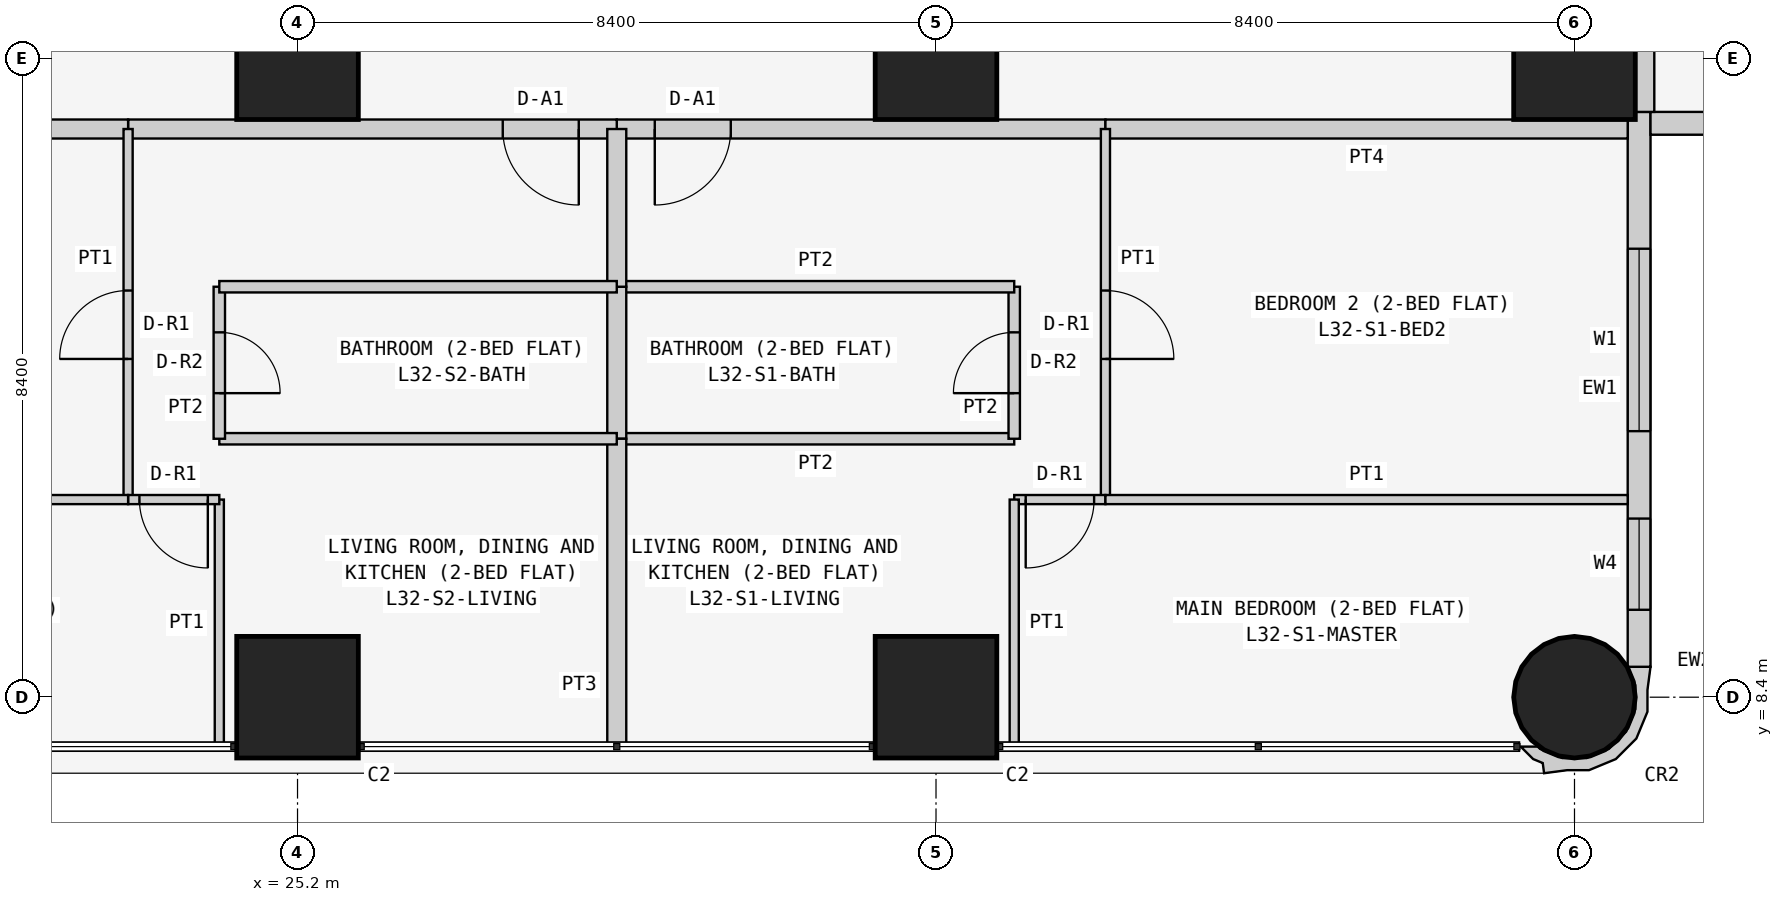
"""IFC4 building model, lengths in metres.
Left out: names, types, materials, properties, quantities, classifications, styles, units other than length and angle.
Written with IfcOpenShell. Run it as: python <this file> out.ifc"""

import sys

from ifc_helpers import new_model, si_unit, direction, frame, frame_2d, origin, origin_2d, place, context, subcontext, project, spatial, polyline, rectangle, circle, outline, extrude, element, fill, save


model = new_model("IFC4")
c1 = context("Model", 3, precision=1e-05, world=origin(), true_north=direction((0.0, 1.0)))
c2 = subcontext(c1, "Body", "Model", "MODEL_VIEW")
j1 = project(units=[si_unit("LENGTHUNIT", "METRE"), si_unit("PLANEANGLEUNIT", "RADIAN")], contexts=[c1])
p1 = place(None, origin())
s1 = spatial("IfcSite", under=j1, at=p1, CompositionType="ELEMENT")
p2 = place(p1, origin())
s2 = spatial("IfcBuilding", under=s1, at=p2, CompositionType="ELEMENT")
p3 = place(p2, frame((0.0, 0.0, 126.9)))
s3 = spatial("IfcBuildingStorey", under=s2, at=p3, CompositionType="ELEMENT", Elevation=126.9)
for number, where, z_axis, x_axis in (
    (1, (25.2, 8.4, 0.0), (0.0, 0.0, 1.0), (1.0, 0.0, 0.0)),
    (2, (25.2, 16.8, 0.0), (0.0, 0.0, 1.0), (1.0, 0.0, 0.0)),
    (3, (33.6, 8.4, 0.0), (0.0, 0.0, 1.0), (1.0, 0.0, 0.0)),
    (4, (33.6, 16.8, 0.0), (0.0, 0.0, 1.0), (1.0, 0.0, 0.0)),
):
    element("IfcColumn", number, at=place(p3, frame(where, z_axis=z_axis, x_axis=x_axis)), inside=s3, PredefinedType="COLUMN", context=c2, shape_type="SweptSolid", body=[
        extrude(rectangle(XDim=1.6, YDim=1.6, at=origin_2d()), origin(), (0.0, 0.0, 1.0), 3.6),
    ])
p4 = place(p3, frame((42.0, 8.4, 0.0), z_axis=(0.0, 0.0, 1.0), x_axis=(1.0, 0.0, 0.0)))
e5 = element("IfcColumn", 5, at=p4, inside=s3, PredefinedType="COLUMN", context=c2, shape_type="SweptSolid", body=[
    extrude(circle(Radius=0.8, at=origin_2d()), origin(), (0.0, 0.0, 1.0), 3.6),
])
p5 = place(p3, frame((42.0, 16.8, 0.0), z_axis=(0.0, 0.0, 1.0), x_axis=(1.0, 0.0, 0.0)))
e6 = element("IfcColumn", 6, at=p5, inside=s3, PredefinedType="COLUMN", context=c2, shape_type="SweptSolid", body=[
    extrude(rectangle(XDim=1.6, YDim=1.6, at=origin_2d()), origin(), (0.0, 0.0, 1.0), 3.6),
])
p6 = place(p3, frame((42.85, 8.8, 0.0), z_axis=(0.0, 0.0, 1.0), x_axis=(0.0, 1.0, 0.0)))
e7 = element("IfcWall", 7, at=p6, inside=s3, PredefinedType="SOLIDWALL", context=c2, shape_type="SweptSolid", body=[
    extrude(rectangle(XDim=7.3, YDim=0.3, at=frame_2d((3.65, 0.0))), origin(), (0.0, 0.0, 1.0), 3.45),
])
p7 = place(p6, frame((3.1, 0.0, 0.9)))
e8 = element("IfcOpeningElement", 8, at=p7, cuts=e7, PredefinedType="OPENING", context=c2, shape_type="SweptSolid", body=[
    extrude(rectangle(XDim=2.4, YDim=1.5, at=frame_2d((1.2, 0.75))), frame((0.0, 0.16, 0.0), z_axis=(0.0, -1.0, 0.0), x_axis=(1.0, 0.0, 0.0)), (0.0, 0.0, 1.0), 0.32),
])
p8 = place(p6, frame((0.75, 0.0, 0.9)))
e9 = element("IfcOpeningElement", 9, at=p8, cuts=e7, PredefinedType="OPENING", context=c2, shape_type="SweptSolid", body=[
    extrude(rectangle(XDim=1.2, YDim=1.5, at=frame_2d((0.6, 0.75))), frame((0.0, 0.16, 0.0), z_axis=(0.0, -1.0, 0.0), x_axis=(1.0, 0.0, 0.0)), (0.0, 0.0, 1.0), 0.32),
])
p9 = place(p3, frame((43.0, 15.95, 0.0), z_axis=(0.0, 0.0, 1.0), x_axis=(1.0, 0.0, 0.0)))
e10 = element("IfcWall", 10, at=p9, inside=s3, PredefinedType="SOLIDWALL", context=c2, shape_type="SweptSolid", body=[
    extrude(rectangle(XDim=15.4, YDim=0.3, at=frame_2d((7.7, 0.0))), origin(), (0.0, 0.0, 1.0), 3.45),
])
p10 = place(p9, frame((1.2, 0.0, 0.9)))
e11 = element("IfcOpeningElement", 11, at=p10, cuts=e10, PredefinedType="OPENING", context=c2, shape_type="SweptSolid", body=[
    extrude(rectangle(XDim=1.8, YDim=1.5, at=frame_2d((0.9, 0.75))), frame((0.0, 0.16, 0.0), z_axis=(0.0, -1.0, 0.0), x_axis=(1.0, 0.0, 0.0)), (0.0, 0.0, 1.0), 0.32),
])
p11 = place(p9, frame((4.95, 0.0, 1.5)))
e12 = element("IfcOpeningElement", 12, at=p11, cuts=e10, PredefinedType="OPENING", context=c2, shape_type="SweptSolid", body=[
    extrude(rectangle(XDim=0.9, YDim=0.7, at=frame_2d((0.45, 0.35))), frame((0.0, 0.16, 0.0), z_axis=(0.0, -1.0, 0.0), x_axis=(1.0, 0.0, 0.0)), (0.0, 0.0, 1.0), 0.32),
])
p12 = place(p9, frame((8.5, 0.0, 0.9)))
e13 = element("IfcOpeningElement", 13, at=p12, cuts=e10, PredefinedType="OPENING", context=c2, shape_type="SweptSolid", body=[
    extrude(rectangle(XDim=1.8, YDim=1.5, at=frame_2d((0.9, 0.75))), frame((0.0, 0.16, 0.0), z_axis=(0.0, -1.0, 0.0), x_axis=(1.0, 0.0, 0.0)), (0.0, 0.0, 1.0), 0.32),
])
p13 = place(p9, frame((12.5, 0.0, 0.0)))
e14 = element("IfcOpeningElement", 14, at=p13, cuts=e10, PredefinedType="OPENING", context=c2, shape_type="SweptSolid", body=[
    extrude(rectangle(XDim=0.9, YDim=2.4, at=frame_2d((0.45, 1.2))), frame((0.0, 0.16, 0.0), z_axis=(0.0, -1.0, 0.0), x_axis=(1.0, 0.0, 0.0)), (0.0, 0.0, 1.0), 0.32),
])
p14 = place(p9, frame((13.5, 0.0, 0.9)))
e15 = element("IfcOpeningElement", 15, at=p14, cuts=e10, PredefinedType="OPENING", context=c2, shape_type="SweptSolid", body=[
    extrude(rectangle(XDim=1.2, YDim=1.5, at=frame_2d((0.6, 0.75))), frame((0.0, 0.16, 0.0), z_axis=(0.0, -1.0, 0.0), x_axis=(1.0, 0.0, 0.0)), (0.0, 0.0, 1.0), 0.32),
])
p15 = place(p3, frame((41.352, 7.805, 0.0), z_axis=(0.0, 0.0, 1.0), x_axis=(0.343276641956, -0.93923434088, 0.0)))
e16 = element("IfcWall", 16, at=p15, inside=s3, PredefinedType="SOLIDWALL", context=c2, shape_type="SweptSolid", body=[
    extrude(outline(polyline([(-0.369, 1.89), (-0.509, 1.621), (-0.49, 1.615), (-0.479, 1.609), (-0.211, 1.62), (0.088, 1.511), (0.323, 1.295), (0.457, 1.006), (0.47, 0.688), (0.361, 0.389), (0.145, 0.154), (0.108, 0.136), (0.031, -0.075), (0.241, 0.023), (0.333, 0.124), (0.465, 0.094), (0.532, 0.393), (0.631, 0.663), (0.614, 1.044), (0.453, 1.391), (0.172, 1.649), (-0.097, 1.748), (-0.369, 1.89)])), origin(), (0.0, 0.0, 1.0), 3.45),
])
p16 = place(p3, frame((42.925, 22.971, 0.0), z_axis=(0.0, 0.0, 1.0), x_axis=(0.0, -1.0, 0.0)))
e17 = element("IfcWall", 17, at=p16, inside=s3, PredefinedType="PARTITIONING", context=c2, shape_type="SweptSolid", body=[
    extrude(rectangle(XDim=6.871, YDim=0.25, at=frame_2d((3.436, 0.0))), origin(), (0.0, 0.0, 1.0), 3.45),
])
p17 = place(p3, frame((35.829, 15.875, 0.0), z_axis=(0.0, 0.0, 1.0), x_axis=(-1.0, 0.0, 0.0)))
e18 = element("IfcWall", 18, at=p17, inside=s3, PredefinedType="PARTITIONING", context=c2, shape_type="SweptSolid", body=[
    extrude(rectangle(XDim=6.429, YDim=0.25, at=frame_2d((3.215, 0.0))), origin(), (0.0, 0.0, 1.0), 3.45),
])
p18 = place(p17, frame((4.929, 0.0, 0.0)))
e19 = element("IfcOpeningElement", 19, at=p18, cuts=e18, PredefinedType="OPENING", context=c2, shape_type="SweptSolid", body=[
    extrude(rectangle(XDim=1.0, YDim=2.1, at=frame_2d((0.5, 1.05))), frame((0.0, 0.135, 0.0), z_axis=(0.0, -1.0, 0.0), x_axis=(1.0, 0.0, 0.0)), (0.0, 0.0, 1.0), 0.27),
])
p19 = place(p3, frame((42.7, 15.875, 0.0), z_axis=(0.0, 0.0, 1.0), x_axis=(-1.0, 0.0, 0.0)))
e20 = element("IfcWall", 20, at=p19, inside=s3, PredefinedType="PARTITIONING", context=c2, shape_type="SweptSolid", body=[
    extrude(rectangle(XDim=6.871, YDim=0.25, at=frame_2d((3.436, 0.0))), origin(), (0.0, 0.0, 1.0), 3.45),
])
p20 = place(p3, frame((29.4, 15.875, 0.0), z_axis=(0.0, 0.0, 1.0), x_axis=(-1.0, 0.0, 0.0)))
e21 = element("IfcWall", 21, at=p20, inside=s3, PredefinedType="PARTITIONING", context=c2, shape_type="SweptSolid", body=[
    extrude(rectangle(XDim=6.429, YDim=0.25, at=frame_2d((3.214, 0.0))), origin(), (0.0, 0.0, 1.0), 3.45),
])
p21 = place(p20, frame((0.5, 0.0, 0.0)))
e22 = element("IfcOpeningElement", 22, at=p21, cuts=e21, PredefinedType="OPENING", context=c2, shape_type="SweptSolid", body=[
    extrude(rectangle(XDim=1.0, YDim=2.1, at=frame_2d((0.5, 1.05))), frame((0.0, 0.135, 0.0), z_axis=(0.0, -1.0, 0.0), x_axis=(1.0, 0.0, 0.0)), (0.0, 0.0, 1.0), 0.27),
])
p22 = place(p3, frame((22.971, 15.875, 0.0), z_axis=(0.0, 0.0, 1.0), x_axis=(-1.0, 0.0, 0.0)))
e23 = element("IfcWall", 23, at=p22, inside=s3, PredefinedType="PARTITIONING", context=c2, shape_type="SweptSolid", body=[
    extrude(rectangle(XDim=6.871, YDim=0.25, at=frame_2d((3.436, 0.0))), origin(), (0.0, 0.0, 1.0), 3.45),
])
p23 = place(p3, frame((29.4, 11.8, 0.0), z_axis=(0.0, 0.0, 1.0), x_axis=(1.0, 0.0, 0.0)))
e24 = element("IfcWall", 24, at=p23, inside=s3, PredefinedType="PARTITIONING", context=c2, shape_type="SweptSolid", body=[
    extrude(rectangle(XDim=5.229, YDim=0.15, at=frame_2d((2.615, 0.0))), origin(), (0.0, 0.0, 1.0), 3.45),
])
p24 = place(p3, frame((34.629, 11.8, 0.0), z_axis=(0.0, 0.0, 1.0), x_axis=(0.0, 1.0, 0.0)))
e25 = element("IfcWall", 25, at=p24, inside=s3, PredefinedType="PARTITIONING", context=c2, shape_type="SweptSolid", body=[
    extrude(rectangle(XDim=2.0, YDim=0.15, at=frame_2d((1.0, 0.0))), origin(), (0.0, 0.0, 1.0), 3.45),
])
p25 = place(p24, frame((0.6, 0.0, 0.0)))
e26 = element("IfcOpeningElement", 26, at=p25, cuts=e25, PredefinedType="OPENING", context=c2, shape_type="SweptSolid", body=[
    extrude(rectangle(XDim=0.8, YDim=2.1, at=frame_2d((0.4, 1.05))), frame((0.0, 0.085, 0.0), z_axis=(0.0, -1.0, 0.0), x_axis=(1.0, 0.0, 0.0)), (0.0, 0.0, 1.0), 0.17),
])
p26 = place(p3, frame((34.629, 13.8, 0.0), z_axis=(0.0, 0.0, 1.0), x_axis=(-1.0, 0.0, 0.0)))
e27 = element("IfcWall", 27, at=p26, inside=s3, PredefinedType="PARTITIONING", context=c2, shape_type="SweptSolid", body=[
    extrude(rectangle(XDim=5.229, YDim=0.15, at=frame_2d((2.615, 0.0))), origin(), (0.0, 0.0, 1.0), 3.45),
])
p27 = place(p3, frame((29.4, 13.8, 0.0), z_axis=(0.0, 0.0, 1.0), x_axis=(0.0, -1.0, 0.0)))
e28 = element("IfcWall", 28, at=p27, inside=s3, PredefinedType="PARTITIONING", context=c2, shape_type="SweptSolid", body=[
    extrude(rectangle(XDim=2.0, YDim=0.25, at=frame_2d((1.0, 0.0))), origin(), (0.0, 0.0, 1.0), 2.848),
])
p28 = place(p3, frame((35.829, 15.875, 0.0), z_axis=(0.0, 0.0, 1.0), x_axis=(0.0, -1.0, 0.0)))
e29 = element("IfcWall", 29, at=p28, inside=s3, PredefinedType="PARTITIONING", context=c2, shape_type="SweptSolid", body=[
    extrude(rectangle(XDim=4.875, YDim=0.12, at=frame_2d((2.438, 0.0))), origin(), (0.0, 0.0, 1.0), 3.45),
])
p29 = place(p28, frame((2.125, 0.0, 0.0)))
e30 = element("IfcOpeningElement", 30, at=p29, cuts=e29, PredefinedType="OPENING", context=c2, shape_type="SweptSolid", body=[
    extrude(rectangle(XDim=0.9, YDim=2.1, at=frame_2d((0.45, 1.05))), frame((0.0, 0.07, 0.0), z_axis=(0.0, -1.0, 0.0), x_axis=(1.0, 0.0, 0.0)), (0.0, 0.0, 1.0), 0.14),
])
p30 = place(p3, frame((35.829, 11.0, 0.0), z_axis=(0.0, 0.0, 1.0), x_axis=(-1.0, 0.0, 0.0)))
e31 = element("IfcWall", 31, at=p30, inside=s3, PredefinedType="PARTITIONING", context=c2, shape_type="SweptSolid", body=[
    extrude(rectangle(XDim=1.2, YDim=0.12, at=frame_2d((0.6, 0.0))), origin(), (0.0, 0.0, 1.0), 3.45),
])
p31 = place(p30, frame((0.149, 0.0, 0.0)))
e32 = element("IfcOpeningElement", 32, at=p31, cuts=e31, PredefinedType="OPENING", context=c2, shape_type="SweptSolid", body=[
    extrude(rectangle(XDim=0.9, YDim=2.1, at=frame_2d((0.45, 1.05))), frame((0.0, 0.07, 0.0), z_axis=(0.0, -1.0, 0.0), x_axis=(1.0, 0.0, 0.0)), (0.0, 0.0, 1.0), 0.14),
])
p32 = place(p3, frame((34.629, 11.0, 0.0), z_axis=(0.0, 0.0, 1.0), x_axis=(0.0, -1.0, 0.0)))
e33 = element("IfcWall", 33, at=p32, inside=s3, PredefinedType="PARTITIONING", context=c2, shape_type="SweptSolid", body=[
    extrude(rectangle(XDim=3.25, YDim=0.12, at=frame_2d((1.625, 0.0))), origin(), (0.0, 0.0, 1.0), 3.45),
])
p33 = place(p3, frame((29.4, 7.75, 0.0), z_axis=(0.0, 0.0, 1.0), x_axis=(0.0, 1.0, 0.0)))
e34 = element("IfcWall", 34, at=p33, inside=s3, PredefinedType="PARTITIONING", context=c2, shape_type="SweptSolid", body=[
    extrude(rectangle(XDim=4.05, YDim=0.25, at=frame_2d((2.025, 0.0))), origin(), (0.0, 0.0, 1.0), 2.848),
])
p34 = place(p3, frame((29.4, 13.8, 0.0), z_axis=(0.0, 0.0, 1.0), x_axis=(0.0, 1.0, 0.0)))
e35 = element("IfcWall", 35, at=p34, inside=s3, PredefinedType="PARTITIONING", context=c2, shape_type="SweptSolid", body=[
    extrude(rectangle(XDim=2.075, YDim=0.25, at=frame_2d((1.038, 0.0))), origin(), (0.0, 0.0, 1.0), 2.848),
])
p35 = place(p3, frame((35.829, 11.0, 0.0), z_axis=(0.0, 0.0, 1.0), x_axis=(1.0, 0.0, 0.0)))
e36 = element("IfcWall", 36, at=p35, inside=s3, PredefinedType="PARTITIONING", context=c2, shape_type="SweptSolid", body=[
    extrude(rectangle(XDim=6.871, YDim=0.12, at=frame_2d((3.436, 0.0))), origin(), (0.0, 0.0, 1.0), 3.45),
])
p36 = place(p3, frame((29.4, 11.8, 0.0), z_axis=(0.0, 0.0, 1.0), x_axis=(-1.0, 0.0, 0.0)))
e37 = element("IfcWall", 37, at=p36, inside=s3, PredefinedType="PARTITIONING", context=c2, shape_type="SweptSolid", body=[
    extrude(rectangle(XDim=5.229, YDim=0.15, at=frame_2d((2.615, 0.0))), origin(), (0.0, 0.0, 1.0), 3.45),
])
p37 = place(p3, frame((24.171, 11.8, 0.0), z_axis=(0.0, 0.0, 1.0), x_axis=(0.0, 1.0, 0.0)))
e38 = element("IfcWall", 38, at=p37, inside=s3, PredefinedType="PARTITIONING", context=c2, shape_type="SweptSolid", body=[
    extrude(rectangle(XDim=2.0, YDim=0.15, at=frame_2d((1.0, 0.0))), origin(), (0.0, 0.0, 1.0), 3.45),
])
p38 = place(p37, frame((0.6, 0.0, 0.0)))
e39 = element("IfcOpeningElement", 39, at=p38, cuts=e38, PredefinedType="OPENING", context=c2, shape_type="SweptSolid", body=[
    extrude(rectangle(XDim=0.8, YDim=2.1, at=frame_2d((0.4, 1.05))), frame((0.0, 0.085, 0.0), z_axis=(0.0, -1.0, 0.0), x_axis=(1.0, 0.0, 0.0)), (0.0, 0.0, 1.0), 0.17),
])
p39 = place(p3, frame((24.171, 13.8, 0.0), z_axis=(0.0, 0.0, 1.0), x_axis=(1.0, 0.0, 0.0)))
e40 = element("IfcWall", 40, at=p39, inside=s3, PredefinedType="PARTITIONING", context=c2, shape_type="SweptSolid", body=[
    extrude(rectangle(XDim=5.229, YDim=0.15, at=frame_2d((2.615, 0.0))), origin(), (0.0, 0.0, 1.0), 3.45),
])
p40 = place(p3, frame((22.971, 11.0, 0.0), z_axis=(0.0, 0.0, 1.0), x_axis=(0.0, 1.0, 0.0)))
e41 = element("IfcWall", 41, at=p40, inside=s3, PredefinedType="PARTITIONING", context=c2, shape_type="SweptSolid", body=[
    extrude(rectangle(XDim=4.875, YDim=0.12, at=frame_2d((2.438, 0.0))), origin(), (0.0, 0.0, 1.0), 3.45),
])
p41 = place(p40, frame((1.85, 0.0, 0.0)))
e42 = element("IfcOpeningElement", 42, at=p41, cuts=e41, PredefinedType="OPENING", context=c2, shape_type="SweptSolid", body=[
    extrude(rectangle(XDim=0.9, YDim=2.1, at=frame_2d((0.45, 1.05))), frame((0.0, 0.07, 0.0), z_axis=(0.0, -1.0, 0.0), x_axis=(1.0, 0.0, 0.0)), (0.0, 0.0, 1.0), 0.14),
])
p42 = place(p3, frame((24.171, 7.75, 0.0), z_axis=(0.0, 0.0, 1.0), x_axis=(0.0, 1.0, 0.0)))
e43 = element("IfcWall", 43, at=p42, inside=s3, PredefinedType="PARTITIONING", context=c2, shape_type="SweptSolid", body=[
    extrude(rectangle(XDim=3.25, YDim=0.12, at=frame_2d((1.625, 0.0))), origin(), (0.0, 0.0, 1.0), 3.45),
])
p43 = place(p3, frame((24.171, 11.0, 0.0), z_axis=(0.0, 0.0, 1.0), x_axis=(-1.0, 0.0, 0.0)))
e44 = element("IfcWall", 44, at=p43, inside=s3, PredefinedType="PARTITIONING", context=c2, shape_type="SweptSolid", body=[
    extrude(rectangle(XDim=1.2, YDim=0.12, at=frame_2d((0.6, 0.0))), origin(), (0.0, 0.0, 1.0), 3.45),
])
p44 = place(p43, frame((0.151, 0.0, 0.0)))
e45 = element("IfcOpeningElement", 45, at=p44, cuts=e44, PredefinedType="OPENING", context=c2, shape_type="SweptSolid", body=[
    extrude(rectangle(XDim=0.9, YDim=2.1, at=frame_2d((0.45, 1.05))), frame((0.0, 0.07, 0.0), z_axis=(0.0, -1.0, 0.0), x_axis=(1.0, 0.0, 0.0)), (0.0, 0.0, 1.0), 0.14),
])
p45 = place(p3, frame((22.971, 11.0, 0.0), z_axis=(0.0, 0.0, 1.0), x_axis=(-1.0, 0.0, 0.0)))
e46 = element("IfcWall", 46, at=p45, inside=s3, PredefinedType="PARTITIONING", context=c2, shape_type="SweptSolid", body=[
    extrude(rectangle(XDim=6.871, YDim=0.12, at=frame_2d((3.436, 0.0))), origin(), (0.0, 0.0, 1.0), 3.45),
])
p46 = place(p7, origin())
e47 = element("IfcWindow", 47, at=p46, inside=s3, PartitioningType="SINGLE_PANEL", PredefinedType="WINDOW", context=c2, shape_type="SweptSolid", body=[
    extrude(rectangle(XDim=2.4, YDim=1.5, at=frame_2d((1.2, 0.75))), frame((0.0, 0.03, 0.0), z_axis=(0.0, -1.0, 0.0), x_axis=(1.0, 0.0, 0.0)), (0.0, 0.0, 1.0), 0.06),
])
fill(e8, e47)
p47 = place(p8, origin())
e48 = element("IfcWindow", 48, at=p47, inside=s3, PartitioningType="SINGLE_PANEL", PredefinedType="WINDOW", context=c2, shape_type="SweptSolid", body=[
    extrude(rectangle(XDim=1.2, YDim=1.5, at=frame_2d((0.6, 0.75))), frame((0.0, 0.03, 0.0), z_axis=(0.0, -1.0, 0.0), x_axis=(1.0, 0.0, 0.0)), (0.0, 0.0, 1.0), 0.06),
])
fill(e9, e48)
p48 = place(p18, origin())
e49 = element("IfcDoor", 49, at=p48, inside=s3, OperationType="SINGLE_SWING_RIGHT", PredefinedType="DOOR", context=c2, shape_type="SweptSolid", body=[
    extrude(rectangle(XDim=1.0, YDim=2.1, at=frame_2d((0.5, 1.05))), frame((0.0, 0.025, 0.0), z_axis=(0.0, -1.0, 0.0), x_axis=(1.0, 0.0, 0.0)), (0.0, 0.0, 1.0), 0.05),
])
fill(e19, e49)
p49 = place(p25, origin())
e50 = element("IfcDoor", 50, at=p49, inside=s3, OperationType="SINGLE_SWING_LEFT", PredefinedType="DOOR", context=c2, shape_type="SweptSolid", body=[
    extrude(rectangle(XDim=0.8, YDim=2.1, at=frame_2d((0.4, 1.05))), frame((0.0, 0.025, 0.0), z_axis=(0.0, -1.0, 0.0), x_axis=(1.0, 0.0, 0.0)), (0.0, 0.0, 1.0), 0.05),
])
fill(e26, e50)
p50 = place(p29, origin())
e51 = element("IfcDoor", 51, at=p50, inside=s3, OperationType="SINGLE_SWING_RIGHT", PredefinedType="DOOR", context=c2, shape_type="SweptSolid", body=[
    extrude(rectangle(XDim=0.9, YDim=2.1, at=frame_2d((0.45, 1.05))), frame((0.0, 0.025, 0.0), z_axis=(0.0, -1.0, 0.0), x_axis=(1.0, 0.0, 0.0)), (0.0, 0.0, 1.0), 0.05),
])
fill(e30, e51)
p51 = place(p31, origin())
e52 = element("IfcDoor", 52, at=p51, inside=s3, OperationType="SINGLE_SWING_RIGHT", PredefinedType="DOOR", context=c2, shape_type="SweptSolid", body=[
    extrude(rectangle(XDim=0.9, YDim=2.1, at=frame_2d((0.45, 1.05))), frame((0.0, 0.025, 0.0), z_axis=(0.0, -1.0, 0.0), x_axis=(1.0, 0.0, 0.0)), (0.0, 0.0, 1.0), 0.05),
])
fill(e32, e52)
p52 = place(p21, origin())
e53 = element("IfcDoor", 53, at=p52, inside=s3, OperationType="SINGLE_SWING_LEFT", PredefinedType="DOOR", context=c2, shape_type="SweptSolid", body=[
    extrude(rectangle(XDim=1.0, YDim=2.1, at=frame_2d((0.5, 1.05))), frame((0.0, 0.025, 0.0), z_axis=(0.0, -1.0, 0.0), x_axis=(1.0, 0.0, 0.0)), (0.0, 0.0, 1.0), 0.05),
])
fill(e22, e53)
p53 = place(p38, frame((0.8, 0.0, 0.0), z_axis=(0.0, 0.0, 1.0), x_axis=(-1.0, 0.0, 0.0)))
e54 = element("IfcDoor", 54, at=p53, inside=s3, OperationType="SINGLE_SWING_RIGHT", PredefinedType="DOOR", context=c2, shape_type="SweptSolid", body=[
    extrude(rectangle(XDim=0.8, YDim=2.1, at=frame_2d((0.4, 1.05))), frame((0.0, 0.025, 0.0), z_axis=(0.0, -1.0, 0.0), x_axis=(1.0, 0.0, 0.0)), (0.0, 0.0, 1.0), 0.05),
])
fill(e39, e54)
p54 = place(p41, origin())
e55 = element("IfcDoor", 55, at=p54, inside=s3, OperationType="SINGLE_SWING_LEFT", PredefinedType="DOOR", context=c2, shape_type="SweptSolid", body=[
    extrude(rectangle(XDim=0.9, YDim=2.1, at=frame_2d((0.45, 1.05))), frame((0.0, 0.025, 0.0), z_axis=(0.0, -1.0, 0.0), x_axis=(1.0, 0.0, 0.0)), (0.0, 0.0, 1.0), 0.05),
])
fill(e42, e55)
p55 = place(p44, origin())
e56 = element("IfcDoor", 56, at=p55, inside=s3, OperationType="SINGLE_SWING_LEFT", PredefinedType="DOOR", context=c2, shape_type="SweptSolid", body=[
    extrude(rectangle(XDim=0.9, YDim=2.1, at=frame_2d((0.45, 1.05))), frame((0.0, 0.025, 0.0), z_axis=(0.0, -1.0, 0.0), x_axis=(1.0, 0.0, 0.0)), (0.0, 0.0, 1.0), 0.05),
])
fill(e45, e56)
save(model, sys.argv[1])
